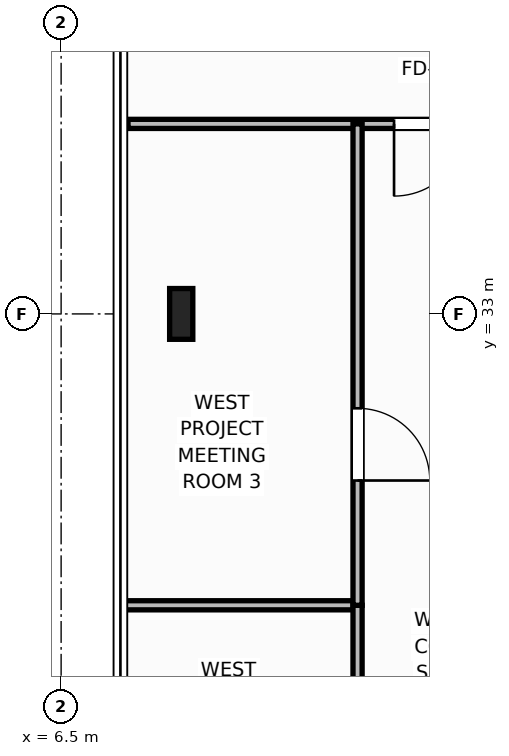
"""IFC4 building model, lengths in metres.
Left out: names, types, materials, properties, quantities, classifications, styles, units other than length and angle.
Written with IfcOpenShell. Run it as: python <this file> out.ifc"""

import sys

from ifc_helpers import new_model, si_unit, direction, frame, frame_2d, origin, origin_2d, place, context, subcontext, project, spatial, rectangle, i_section, extrude, element, fill, save


model = new_model("IFC4")
c1 = context("Model", 3, precision=1e-05, world=origin(), true_north=direction((0.0, 1.0)))
c2 = subcontext(c1, "Body", "Model", "MODEL_VIEW")
j1 = project(units=[si_unit("LENGTHUNIT", "METRE"), si_unit("PLANEANGLEUNIT", "RADIAN")], contexts=[c1])
p1 = place(None, origin())
s1 = spatial("IfcSite", under=j1, at=p1, CompositionType="ELEMENT")
p2 = place(p1, origin())
s2 = spatial("IfcBuilding", under=s1, at=p2, CompositionType="ELEMENT")
p3 = place(p2, frame((0.0, 0.0, 290.4)))
s3 = spatial("IfcBuildingStorey", under=s2, at=p3, CompositionType="ELEMENT", Elevation=290.4)
p4 = place(p3, frame((8.08, 33.0, 0.0), z_axis=(0.0, 0.0, 1.0), x_axis=(1.0, 0.0, 0.0)))
e1 = element("IfcColumn", 1, at=p4, inside=s3, PredefinedType="COLUMN", context=c2, shape_type="SweptSolid", body=[
    extrude(i_section(OverallWidth=0.305, OverallDepth=0.668, WebThickness=0.021, FlangeThickness=0.04, at=origin_2d()), origin(), (0.0, 0.0, 1.0), 4.0),
])
p5 = place(p3, frame((7.38, 35.5, 0.0), z_axis=(0.0, 0.0, 1.0), x_axis=(1.0, 0.0, 0.0)))
e2 = element("IfcWall", 2, at=p5, inside=s3, PredefinedType="PARTITIONING", context=c2, shape_type="SweptSolid", body=[
    extrude(rectangle(XDim=5.865, YDim=0.12, at=frame_2d((2.932, 0.0))), origin(), (0.0, 0.0, 1.0), 3.788),
])
p6 = place(p5, frame((3.5, 0.0, 0.0)))
e3 = element("IfcOpeningElement", 3, at=p6, cuts=e2, PredefinedType="OPENING", context=c2, shape_type="SweptSolid", body=[
    extrude(rectangle(XDim=0.95, YDim=2.15, at=frame_2d((0.475, 1.075))), frame((0.0, 0.07, 0.0), z_axis=(0.0, -1.0, 0.0), x_axis=(1.0, 0.0, 0.0)), (0.0, 0.0, 1.0), 0.14),
])
p7 = place(p3, frame((7.22, 29.167, 0.0), z_axis=(0.0, 0.0, 1.0), x_axis=(1.0, 0.0, 0.0)))
e4 = element("IfcWall", 4, at=p7, inside=s3, PredefinedType="PARTITIONING", context=c2, shape_type="SweptSolid", body=[
    extrude(rectangle(XDim=3.18, YDim=0.12, at=frame_2d((1.59, 0.0))), origin(), (0.0, 0.0, 1.0), 3.788),
])
p8 = place(p3, frame((10.4, 22.833, 0.0), z_axis=(0.0, 0.0, 1.0), x_axis=(0.0, 1.0, 0.0)))
e5 = element("IfcWall", 5, at=p8, inside=s3, PredefinedType="PARTITIONING", context=c2, shape_type="SweptSolid", body=[
    extrude(rectangle(XDim=6.333, YDim=0.12, at=frame_2d((3.167, 0.0))), origin(), (0.0, 0.0, 1.0), 3.788),
])
p9 = place(p8, frame((2.692, 0.0, 0.0)))
e6 = element("IfcOpeningElement", 6, at=p9, cuts=e5, PredefinedType="OPENING", context=c2, shape_type="SweptSolid", body=[
    extrude(rectangle(XDim=0.95, YDim=2.15, at=frame_2d((0.475, 1.075))), frame((0.0, 0.07, 0.0), z_axis=(0.0, -1.0, 0.0), x_axis=(1.0, 0.0, 0.0)), (0.0, 0.0, 1.0), 0.14),
])
p10 = place(p3, frame((10.4, 29.167, 0.0), z_axis=(0.0, 0.0, 1.0), x_axis=(0.0, 1.0, 0.0)))
e7 = element("IfcWall", 7, at=p10, inside=s3, PredefinedType="PARTITIONING", context=c2, shape_type="SweptSolid", body=[
    extrude(rectangle(XDim=6.333, YDim=0.12, at=frame_2d((3.167, 0.0))), origin(), (0.0, 0.0, 1.0), 3.788),
])
p11 = place(p10, frame((1.642, 0.0, 0.0)))
e8 = element("IfcOpeningElement", 8, at=p11, cuts=e7, PredefinedType="OPENING", context=c2, shape_type="SweptSolid", body=[
    extrude(rectangle(XDim=0.95, YDim=2.15, at=frame_2d((0.475, 1.075))), frame((0.0, 0.07, 0.0), z_axis=(0.0, -1.0, 0.0), x_axis=(1.0, 0.0, 0.0)), (0.0, 0.0, 1.0), 0.14),
])
p12 = place(p6, origin())
e9 = element("IfcDoor", 9, at=p12, inside=s3, OperationType="SINGLE_SWING_RIGHT", PredefinedType="DOOR", context=c2, shape_type="SweptSolid", body=[
    extrude(rectangle(XDim=0.95, YDim=2.15, at=frame_2d((0.475, 1.075))), frame((0.0, 0.025, 0.0), z_axis=(0.0, -1.0, 0.0), x_axis=(1.0, 0.0, 0.0)), (0.0, 0.0, 1.0), 0.05),
])
fill(e3, e9)
p13 = place(p11, origin())
e10 = element("IfcDoor", 10, at=p13, inside=s3, OperationType="SINGLE_SWING_RIGHT", PredefinedType="DOOR", context=c2, shape_type="SweptSolid", body=[
    extrude(rectangle(XDim=0.95, YDim=2.15, at=frame_2d((0.475, 1.075))), frame((0.0, 0.025, 0.0), z_axis=(0.0, -1.0, 0.0), x_axis=(1.0, 0.0, 0.0)), (0.0, 0.0, 1.0), 0.05),
])
fill(e8, e10)
save(model, sys.argv[1])
